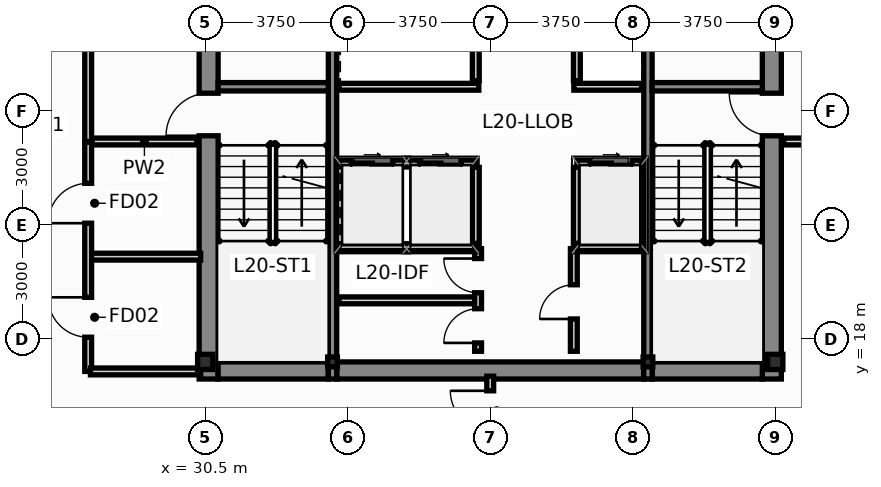
"""IFC4 building model, lengths in metres.
Left out: names, types, materials, properties, quantities, classifications, styles, units other than length and angle.
Written with IfcOpenShell. Run it as: python <this file> out.ifc"""

import sys

from ifc_helpers import new_model, si_unit, direction, frame, frame_2d, origin, origin_2d, place, context, subcontext, project, spatial, rectangle, i_section, extrude, source, transform, mapped, element, fill, save


model = new_model("IFC4")
c1 = context("Model", 3, precision=1e-05, world=origin(), true_north=direction((0.0, 1.0)))
c2 = subcontext(c1, "Body", "Model", "MODEL_VIEW")
j1 = project(units=[si_unit("LENGTHUNIT", "METRE"), si_unit("PLANEANGLEUNIT", "RADIAN")], contexts=[c1])
p1 = place(None, origin())
s1 = spatial("IfcSite", under=j1, at=p1, CompositionType="ELEMENT")
p2 = place(p1, origin())
s2 = spatial("IfcBuilding", under=s1, at=p2, CompositionType="ELEMENT")
p3 = place(p2, frame((0.0, 0.0, 79.85)))
s3 = spatial("IfcBuildingStorey", under=s2, at=p3, CompositionType="ELEMENT", Elevation=79.85)
m1 = source(origin(), c2, "Body", "SweptSolid", [
    extrude(i_section(OverallWidth=0.4, OverallDepth=0.4, WebThickness=0.02, FlangeThickness=0.032, at=origin_2d()), origin(), (0.0, 0.0, 1.0), 3.65),
])
for number, where, z_axis, x_axis in (
    (1, (30.5, 17.4, 0.0), (0.0, 0.0, 1.0), (1.0, 0.0, 0.0)),
    (2, (45.5, 17.4, 0.0), (0.0, 0.0, 1.0), (1.0, 0.0, 0.0)),
):
    element("IfcColumn", number, at=place(p3, frame(where, z_axis=z_axis, x_axis=x_axis)), inside=s3, PredefinedType="COLUMN", context=c2, shape_type="MappedRepresentation", body=[
        mapped(m1, transform((0.0, 0.0, 0.0), scale=1.0)),
    ])
m2 = source(origin(), c2, "Body", "SweptSolid", [
    extrude(i_section(OverallWidth=0.256, OverallDepth=0.26, WebThickness=0.01, FlangeThickness=0.017, at=origin_2d()), origin(), (0.0, 0.0, 1.0), 3.65),
])
for number, where, z_axis, x_axis in (
    (3, (33.85, 17.4, 0.0), (0.0, 0.0, 1.0), (1.0, 0.0, 0.0)),
    (4, (42.15, 17.4, 0.0), (0.0, 0.0, 1.0), (1.0, 0.0, 0.0)),
):
    element("IfcColumn", number, at=place(p3, frame(where, z_axis=z_axis, x_axis=x_axis)), inside=s3, PredefinedType="COLUMN", context=c2, shape_type="MappedRepresentation", body=[
        mapped(m2, transform((0.0, 0.0, 0.0), scale=1.0)),
    ])
p4 = place(p3, frame((30.59, 16.95, 0.0), z_axis=(0.0, 0.0, 1.0), x_axis=(0.0, 1.0, 0.0)))
e5 = element("IfcWall", 5, at=p4, inside=s3, PredefinedType="SHEAR", context=c2, shape_type="SweptSolid", body=[
    extrude(rectangle(XDim=13.275, YDim=0.5, at=frame_2d((6.638, 0.0))), origin(), (0.0, 0.0, 1.0), 3.65),
])
p5 = place(p4, frame((6.4, 0.0, 0.0)))
e6 = element("IfcOpeningElement", 6, at=p5, cuts=e5, PredefinedType="OPENING", context=c2, shape_type="SweptSolid", body=[
    extrude(rectangle(XDim=1.12, YDim=2.15, at=frame_2d((0.56, 1.075))), frame((0.0, 0.262, 0.0), z_axis=(0.0, -1.0, 0.0), x_axis=(1.0, 0.0, 0.0)), (0.0, 0.0, 1.0), 0.524),
])
p6 = place(p4, frame((10.85, 0.0, 0.0)))
e7 = element("IfcOpeningElement", 7, at=p6, cuts=e5, PredefinedType="OPENING", context=c2, shape_type="SweptSolid", body=[
    extrude(rectangle(XDim=1.2, YDim=2.2, at=frame_2d((0.6, 1.1))), frame((0.0, 0.262, 0.0), z_axis=(0.0, -1.0, 0.0), x_axis=(1.0, 0.0, 0.0)), (0.0, 0.0, 1.0), 0.524),
])
p7 = place(p3, frame((45.41, 16.95, 0.0), z_axis=(0.0, 0.0, 1.0), x_axis=(0.0, 1.0, 0.0)))
e8 = element("IfcWall", 8, at=p7, inside=s3, PredefinedType="SHEAR", context=c2, shape_type="SweptSolid", body=[
    extrude(rectangle(XDim=13.275, YDim=0.5, at=frame_2d((6.638, 0.0))), origin(), (0.0, 0.0, 1.0), 3.65),
])
p8 = place(p7, frame((6.4, 0.0, 0.0)))
e9 = element("IfcOpeningElement", 9, at=p8, cuts=e8, PredefinedType="OPENING", context=c2, shape_type="SweptSolid", body=[
    extrude(rectangle(XDim=1.12, YDim=2.15, at=frame_2d((0.56, 1.075))), frame((0.0, 0.262, 0.0), z_axis=(0.0, -1.0, 0.0), x_axis=(1.0, 0.0, 0.0)), (0.0, 0.0, 1.0), 0.524),
])
p9 = place(p7, frame((10.85, 0.0, 0.0)))
e10 = element("IfcOpeningElement", 10, at=p9, cuts=e8, PredefinedType="OPENING", context=c2, shape_type="SweptSolid", body=[
    extrude(rectangle(XDim=1.2, YDim=2.2, at=frame_2d((0.6, 1.1))), frame((0.0, 0.262, 0.0), z_axis=(0.0, -1.0, 0.0), x_axis=(1.0, 0.0, 0.0)), (0.0, 0.0, 1.0), 0.524),
])
p10 = place(p3, frame((30.84, 17.175, 0.0), z_axis=(0.0, 0.0, 1.0), x_axis=(1.0, 0.0, 0.0)))
e11 = element("IfcWall", 11, at=p10, inside=s3, PredefinedType="SHEAR", context=c2, shape_type="SweptSolid", body=[
    extrude(rectangle(XDim=2.9, YDim=0.45, at=frame_2d((1.45, 0.0))), origin(), (0.0, 0.0, 1.0), 3.65),
])
p11 = place(p3, frame((33.96, 17.175, 0.0), z_axis=(0.0, 0.0, 1.0), x_axis=(1.0, 0.0, 0.0)))
e12 = element("IfcWall", 12, at=p11, inside=s3, PredefinedType="SHEAR", context=c2, shape_type="SweptSolid", body=[
    extrude(rectangle(XDim=8.08, YDim=0.45, at=frame_2d((4.04, 0.0))), origin(), (0.0, 0.0, 1.0), 3.65),
])
p12 = place(p3, frame((42.26, 17.175, 0.0), z_axis=(0.0, 0.0, 1.0), x_axis=(1.0, 0.0, 0.0)))
e13 = element("IfcWall", 13, at=p12, inside=s3, PredefinedType="SHEAR", context=c2, shape_type="SweptSolid", body=[
    extrude(rectangle(XDim=2.9, YDim=0.45, at=frame_2d((1.45, 0.0))), origin(), (0.0, 0.0, 1.0), 3.65),
])
for number, where, z_axis, x_axis in (
    (14, (33.85, 16.95, 0.0), (0.0, 0.0, 1.0), (0.0, 1.0, 0.0)),
    (15, (42.15, 16.95, 0.0), (0.0, 0.0, 1.0), (0.0, 1.0, 0.0)),
):
    element("IfcWall", number, at=place(p3, frame(where, z_axis=z_axis, x_axis=x_axis)), inside=s3, PredefinedType="SHEAR", context=c2, shape_type="SweptSolid", body=[
        extrude(rectangle(XDim=13.275, YDim=0.22, at=frame_2d((6.638, 0.0))), origin(), (0.0, 0.0, 1.0), 3.65),
    ])
for number, where, z_axis, x_axis in (
    (16, (30.84, 24.64, 0.0), (0.0, 0.0, 1.0), (1.0, 0.0, 0.0)),
    (17, (42.26, 24.64, 0.0), (0.0, 0.0, 1.0), (1.0, 0.0, 0.0)),
):
    element("IfcWall", number, at=place(p3, frame(where, z_axis=z_axis, x_axis=x_axis)), inside=s3, PredefinedType="SHEAR", context=c2, shape_type="SweptSolid", body=[
        extrude(rectangle(XDim=2.9, YDim=0.22, at=frame_2d((1.45, 0.0))), origin(), (0.0, 0.0, 1.0), 3.65),
    ])
p13 = place(p3, frame((34.02, 22.62, 0.0), z_axis=(0.0, 0.0, 1.0), x_axis=(1.0, 0.0, 0.0)))
e18 = element("IfcWall", 18, at=p13, inside=s3, PredefinedType="PARTITIONING", context=c2, shape_type="SweptSolid", body=[
    extrude(rectangle(XDim=3.6, YDim=0.18, at=frame_2d((1.8, 0.0))), origin(), (0.0, 0.0, 1.0), 3.4),
])
p14 = place(p13, frame((0.32, 0.0, 0.0)))
e19 = element("IfcOpeningElement", 19, at=p14, cuts=e18, PredefinedType="OPENING", context=c2, shape_type="SweptSolid", body=[
    extrude(rectangle(XDim=1.1, YDim=2.2, at=frame_2d((0.55, 1.1))), frame((0.0, 0.102, 0.0), z_axis=(0.0, -1.0, 0.0), x_axis=(1.0, 0.0, 0.0)), (0.0, 0.0, 1.0), 0.204),
])
p15 = place(p13, frame((2.12, 0.0, 0.0)))
e20 = element("IfcOpeningElement", 20, at=p15, cuts=e18, PredefinedType="OPENING", context=c2, shape_type="SweptSolid", body=[
    extrude(rectangle(XDim=1.1, YDim=2.2, at=frame_2d((0.55, 1.1))), frame((0.0, 0.102, 0.0), z_axis=(0.0, -1.0, 0.0), x_axis=(1.0, 0.0, 0.0)), (0.0, 0.0, 1.0), 0.204),
])
p16 = place(p3, frame((40.28, 22.62, 0.0), z_axis=(0.0, 0.0, 1.0), x_axis=(1.0, 0.0, 0.0)))
e21 = element("IfcWall", 21, at=p16, inside=s3, PredefinedType="PARTITIONING", context=c2, shape_type="SweptSolid", body=[
    extrude(rectangle(XDim=1.7, YDim=0.18, at=frame_2d((0.85, 0.0))), origin(), (0.0, 0.0, 1.0), 3.4),
])
p17 = place(p16, frame((0.35, 0.0, 0.0)))
e22 = element("IfcOpeningElement", 22, at=p17, cuts=e21, PredefinedType="OPENING", context=c2, shape_type="SweptSolid", body=[
    extrude(rectangle(XDim=1.1, YDim=2.2, at=frame_2d((0.55, 1.1))), frame((0.0, 0.102, 0.0), z_axis=(0.0, -1.0, 0.0), x_axis=(1.0, 0.0, 0.0)), (0.0, 0.0, 1.0), 0.204),
])
for number, where, z_axis, x_axis in (
    (23, (37.62, 20.52, 0.0), (0.0, 0.0, 1.0), (0.0, 1.0, 0.0)),
    (24, (40.28, 20.52, 0.0), (0.0, 0.0, 1.0), (0.0, 1.0, 0.0)),
    (25, (37.62, 24.8, 0.0), (0.0, 0.0, 1.0), (0.0, 1.0, 0.0)),
    (26, (40.28, 24.8, 0.0), (0.0, 0.0, 1.0), (0.0, 1.0, 0.0)),
):
    element("IfcWall", number, at=place(p3, frame(where, z_axis=z_axis, x_axis=x_axis)), inside=s3, PredefinedType="PARTITIONING", context=c2, shape_type="SweptSolid", body=[
        extrude(rectangle(XDim=2.0, YDim=0.18, at=frame_2d((1.0, 0.0))), origin(), (0.0, 0.0, 1.0), 3.4),
    ])
p18 = place(p3, frame((34.02, 24.64, 0.0), z_axis=(0.0, 0.0, 1.0), x_axis=(1.0, 0.0, 0.0)))
e27 = element("IfcWall", 27, at=p18, inside=s3, PredefinedType="PARTITIONING", context=c2, shape_type="SweptSolid", body=[
    extrude(rectangle(XDim=3.68, YDim=0.18, at=frame_2d((1.84, 0.0))), origin(), (0.0, 0.0, 1.0), 3.4),
])
p19 = place(p3, frame((40.2, 24.64, 0.0), z_axis=(0.0, 0.0, 1.0), x_axis=(1.0, 0.0, 0.0)))
e28 = element("IfcWall", 28, at=p19, inside=s3, PredefinedType="PARTITIONING", context=c2, shape_type="SweptSolid", body=[
    extrude(rectangle(XDim=1.78, YDim=0.18, at=frame_2d((0.89, 0.0))), origin(), (0.0, 0.0, 1.0), 3.4),
])
p20 = place(p3, frame((27.42, 23.2, 0.0), z_axis=(0.0, 0.0, 1.0), x_axis=(0.0, 1.0, 0.0)))
e29 = element("IfcWall", 29, at=p20, inside=s3, PredefinedType="PARTITIONING", context=c2, shape_type="SweptSolid", body=[
    extrude(rectangle(XDim=6.4, YDim=0.18, at=frame_2d((3.2, 0.0))), origin(), (0.0, 0.0, 1.0), 3.4),
])
p21 = place(p20, frame((2.65, 0.0, 0.0)))
e30 = element("IfcOpeningElement", 30, at=p21, cuts=e29, PredefinedType="OPENING", context=c2, shape_type="SweptSolid", body=[
    extrude(rectangle(XDim=1.05, YDim=2.15, at=frame_2d((0.525, 1.075))), frame((0.0, 0.102, 0.0), z_axis=(0.0, -1.0, 0.0), x_axis=(1.0, 0.0, 0.0)), (0.0, 0.0, 1.0), 0.204),
])
for number, where, z_axis, x_axis in (
    (31, (27.52, 23.2, 0.0), (0.0, 0.0, 1.0), (1.0, 0.0, 0.0)),
    (32, (45.72, 23.2, 0.0), (0.0, 0.0, 1.0), (1.0, 0.0, 0.0)),
):
    element("IfcWall", number, at=place(p3, frame(where, z_axis=z_axis, x_axis=x_axis)), inside=s3, PredefinedType="PARTITIONING", context=c2, shape_type="SweptSolid", body=[
        extrude(rectangle(XDim=2.76, YDim=0.18, at=frame_2d((1.38, 0.0))), origin(), (0.0, 0.0, 1.0), 3.4),
    ])
p22 = place(p3, frame((34.02, 20.42, 0.0), z_axis=(0.0, 0.0, 1.0), x_axis=(1.0, 0.0, 0.0)))
e33 = element("IfcWall", 33, at=p22, inside=s3, PredefinedType="PARTITIONING", context=c2, shape_type="SweptSolid", body=[
    extrude(rectangle(XDim=3.64, YDim=0.18, at=frame_2d((1.82, 0.0))), origin(), (0.0, 0.0, 1.0), 3.4),
])
p23 = place(p3, frame((40.22, 20.42, 0.0), z_axis=(0.0, 0.0, 1.0), x_axis=(1.0, 0.0, 0.0)))
e34 = element("IfcWall", 34, at=p23, inside=s3, PredefinedType="PARTITIONING", context=c2, shape_type="SweptSolid", body=[
    extrude(rectangle(XDim=1.76, YDim=0.18, at=frame_2d((0.88, 0.0))), origin(), (0.0, 0.0, 1.0), 3.4),
])
p24 = place(p3, frame((34.02, 19.02, 0.0), z_axis=(0.0, 0.0, 1.0), x_axis=(1.0, 0.0, 0.0)))
e35 = element("IfcWall", 35, at=p24, inside=s3, PredefinedType="PARTITIONING", context=c2, shape_type="SweptSolid", body=[
    extrude(rectangle(XDim=3.58, YDim=0.18, at=frame_2d((1.79, 0.0))), origin(), (0.0, 0.0, 1.0), 3.4),
])
p25 = place(p3, frame((37.68, 17.68, 0.0), z_axis=(0.0, 0.0, 1.0), x_axis=(0.0, 1.0, 0.0)))
e36 = element("IfcWall", 36, at=p25, inside=s3, PredefinedType="PARTITIONING", context=c2, shape_type="SweptSolid", body=[
    extrude(rectangle(XDim=2.7, YDim=0.18, at=frame_2d((1.35, 0.0))), origin(), (0.0, 0.0, 1.0), 3.4),
])
p26 = place(p25, frame((0.22, 0.0, 0.0)))
e37 = element("IfcOpeningElement", 37, at=p26, cuts=e36, PredefinedType="OPENING", context=c2, shape_type="SweptSolid", body=[
    extrude(rectangle(XDim=0.9, YDim=2.1, at=frame_2d((0.45, 1.05))), frame((0.0, 0.102, 0.0), z_axis=(0.0, -1.0, 0.0), x_axis=(1.0, 0.0, 0.0)), (0.0, 0.0, 1.0), 0.204),
])
p27 = place(p25, frame((1.54, 0.0, 0.0)))
e38 = element("IfcOpeningElement", 38, at=p27, cuts=e36, PredefinedType="OPENING", context=c2, shape_type="SweptSolid", body=[
    extrude(rectangle(XDim=0.9, YDim=2.1, at=frame_2d((0.45, 1.05))), frame((0.0, 0.102, 0.0), z_axis=(0.0, -1.0, 0.0), x_axis=(1.0, 0.0, 0.0)), (0.0, 0.0, 1.0), 0.204),
])
p28 = place(p3, frame((40.2, 17.68, 0.0), z_axis=(0.0, 0.0, 1.0), x_axis=(0.0, 1.0, 0.0)))
e39 = element("IfcWall", 39, at=p28, inside=s3, PredefinedType="PARTITIONING", context=c2, shape_type="SweptSolid", body=[
    extrude(rectangle(XDim=2.7, YDim=0.18, at=frame_2d((1.35, 0.0))), origin(), (0.0, 0.0, 1.0), 3.4),
])
p29 = place(p28, frame((0.85, 0.0, 0.0)))
e40 = element("IfcOpeningElement", 40, at=p29, cuts=e39, PredefinedType="OPENING", context=c2, shape_type="SweptSolid", body=[
    extrude(rectangle(XDim=0.9, YDim=2.1, at=frame_2d((0.45, 1.05))), frame((0.0, 0.102, 0.0), z_axis=(0.0, -1.0, 0.0), x_axis=(1.0, 0.0, 0.0)), (0.0, 0.0, 1.0), 0.204),
])
p30 = place(p3, frame((27.48, 20.17, 0.0), z_axis=(0.0, 0.0, 1.0), x_axis=(1.0, 0.0, 0.0)))
e41 = element("IfcWall", 41, at=p30, inside=s3, PredefinedType="PARTITIONING", context=c2, shape_type="SweptSolid", body=[
    extrude(rectangle(XDim=2.9, YDim=0.18, at=frame_2d((1.45, 0.0))), origin(), (0.0, 0.0, 1.0), 3.4),
])
p31 = place(p3, frame((27.42, 17.15, 0.0), z_axis=(0.0, 0.0, 1.0), x_axis=(0.0, 1.0, 0.0)))
e42 = element("IfcWall", 42, at=p31, inside=s3, PredefinedType="PARTITIONING", context=c2, shape_type="SweptSolid", body=[
    extrude(rectangle(XDim=6.03, YDim=0.18, at=frame_2d((3.015, 0.0))), origin(), (0.0, 0.0, 1.0), 3.026),
])
p32 = place(p31, frame((0.9, 0.0, 0.0)))
e43 = element("IfcOpeningElement", 43, at=p32, cuts=e42, PredefinedType="OPENING", context=c2, shape_type="SweptSolid", body=[
    extrude(rectangle(XDim=1.05, YDim=2.15, at=frame_2d((0.525, 1.075))), frame((0.0, 0.102, 0.0), z_axis=(0.0, -1.0, 0.0), x_axis=(1.0, 0.0, 0.0)), (0.0, 0.0, 1.0), 0.204),
])
p33 = place(p31, frame((3.9, 0.0, 0.0)))
e44 = element("IfcOpeningElement", 44, at=p33, cuts=e42, PredefinedType="OPENING", context=c2, shape_type="SweptSolid", body=[
    extrude(rectangle(XDim=1.05, YDim=2.15, at=frame_2d((0.525, 1.075))), frame((0.0, 0.102, 0.0), z_axis=(0.0, -1.0, 0.0), x_axis=(1.0, 0.0, 0.0)), (0.0, 0.0, 1.0), 0.204),
])
p34 = place(p3, frame((27.48, 17.15, 0.0), z_axis=(0.0, 0.0, 1.0), x_axis=(1.0, 0.0, 0.0)))
e45 = element("IfcWall", 45, at=p34, inside=s3, PredefinedType="PARTITIONING", context=c2, shape_type="SweptSolid", body=[
    extrude(rectangle(XDim=2.9, YDim=0.18, at=frame_2d((1.45, 0.0))), origin(), (0.0, 0.0, 1.0), 2.783),
])
p35 = place(p3, frame((38.0, 15.205, 0.0), z_axis=(0.0, 0.0, 1.0), x_axis=(0.0, 1.0, 0.0)))
e46 = element("IfcWall", 46, at=p35, inside=s3, PredefinedType="PARTITIONING", context=c2, shape_type="SweptSolid", body=[
    extrude(rectangle(XDim=1.82, YDim=0.18, at=frame_2d((0.91, 0.0))), origin(), (0.0, 0.0, 1.0), 3.4),
])
p36 = place(p35, frame((0.385, 0.0, 0.0)))
e47 = element("IfcOpeningElement", 47, at=p36, cuts=e46, PredefinedType="OPENING", context=c2, shape_type="SweptSolid", body=[
    extrude(rectangle(XDim=1.05, YDim=2.15, at=frame_2d((0.525, 1.075))), frame((0.0, 0.102, 0.0), z_axis=(0.0, -1.0, 0.0), x_axis=(1.0, 0.0, 0.0)), (0.0, 0.0, 1.0), 0.204),
])
p37 = place(p5, origin())
e48 = element("IfcDoor", 48, at=p37, inside=s3, OperationType="SINGLE_SWING_LEFT", PredefinedType="DOOR", context=c2, shape_type="SweptSolid", body=[
    extrude(rectangle(XDim=1.12, YDim=2.15, at=frame_2d((0.56, 1.075))), frame((0.0, 0.025, 0.0), z_axis=(0.0, -1.0, 0.0), x_axis=(1.0, 0.0, 0.0)), (0.0, 0.0, 1.0), 0.05),
])
fill(e6, e48)
p38 = place(p8, origin())
e49 = element("IfcDoor", 49, at=p38, inside=s3, OperationType="SINGLE_SWING_RIGHT", PredefinedType="DOOR", context=c2, shape_type="SweptSolid", body=[
    extrude(rectangle(XDim=1.12, YDim=2.15, at=frame_2d((0.56, 1.075))), frame((0.0, 0.025, 0.0), z_axis=(0.0, -1.0, 0.0), x_axis=(1.0, 0.0, 0.0)), (0.0, 0.0, 1.0), 0.05),
])
fill(e9, e49)
p39 = place(p14, origin())
e50 = element("IfcDoor", 50, at=p39, inside=s3, OperationType="SLIDING_TO_LEFT", PredefinedType="DOOR", context=c2, shape_type="SweptSolid", body=[
    extrude(rectangle(XDim=1.1, YDim=2.2, at=frame_2d((0.55, 1.1))), frame((0.0, 0.025, 0.0), z_axis=(0.0, -1.0, 0.0), x_axis=(1.0, 0.0, 0.0)), (0.0, 0.0, 1.0), 0.05),
])
fill(e19, e50)
p40 = place(p15, origin())
e51 = element("IfcDoor", 51, at=p40, inside=s3, OperationType="SLIDING_TO_RIGHT", PredefinedType="DOOR", context=c2, shape_type="SweptSolid", body=[
    extrude(rectangle(XDim=1.1, YDim=2.2, at=frame_2d((0.55, 1.1))), frame((0.0, 0.025, 0.0), z_axis=(0.0, -1.0, 0.0), x_axis=(1.0, 0.0, 0.0)), (0.0, 0.0, 1.0), 0.05),
])
fill(e20, e51)
p41 = place(p17, origin())
e52 = element("IfcDoor", 52, at=p41, inside=s3, OperationType="SLIDING_TO_LEFT", PredefinedType="DOOR", context=c2, shape_type="SweptSolid", body=[
    extrude(rectangle(XDim=1.1, YDim=2.2, at=frame_2d((0.55, 1.1))), frame((0.0, 0.025, 0.0), z_axis=(0.0, -1.0, 0.0), x_axis=(1.0, 0.0, 0.0)), (0.0, 0.0, 1.0), 0.05),
])
fill(e22, e52)
p42 = place(p26, origin())
e53 = element("IfcDoor", 53, at=p42, inside=s3, OperationType="SINGLE_SWING_LEFT", PredefinedType="DOOR", context=c2, shape_type="SweptSolid", body=[
    extrude(rectangle(XDim=0.9, YDim=2.1, at=frame_2d((0.45, 1.05))), frame((0.0, 0.025, 0.0), z_axis=(0.0, -1.0, 0.0), x_axis=(1.0, 0.0, 0.0)), (0.0, 0.0, 1.0), 0.05),
])
fill(e37, e53)
p43 = place(p27, origin())
e54 = element("IfcDoor", 54, at=p43, inside=s3, OperationType="SINGLE_SWING_RIGHT", PredefinedType="DOOR", context=c2, shape_type="SweptSolid", body=[
    extrude(rectangle(XDim=0.9, YDim=2.1, at=frame_2d((0.45, 1.05))), frame((0.0, 0.025, 0.0), z_axis=(0.0, -1.0, 0.0), x_axis=(1.0, 0.0, 0.0)), (0.0, 0.0, 1.0), 0.05),
])
fill(e38, e54)
p44 = place(p29, origin())
e55 = element("IfcDoor", 55, at=p44, inside=s3, OperationType="SINGLE_SWING_LEFT", PredefinedType="DOOR", context=c2, shape_type="SweptSolid", body=[
    extrude(rectangle(XDim=0.9, YDim=2.1, at=frame_2d((0.45, 1.05))), frame((0.0, 0.025, 0.0), z_axis=(0.0, -1.0, 0.0), x_axis=(1.0, 0.0, 0.0)), (0.0, 0.0, 1.0), 0.05),
])
fill(e40, e55)
p45 = place(p32, origin())
e56 = element("IfcDoor", 56, at=p45, inside=s3, OperationType="SINGLE_SWING_RIGHT", PredefinedType="DOOR", context=c2, shape_type="SweptSolid", body=[
    extrude(rectangle(XDim=1.05, YDim=2.15, at=frame_2d((0.525, 1.075))), frame((0.0, 0.025, 0.0), z_axis=(0.0, -1.0, 0.0), x_axis=(1.0, 0.0, 0.0)), (0.0, 0.0, 1.0), 0.05),
])
fill(e43, e56)
p46 = place(p33, origin())
e57 = element("IfcDoor", 57, at=p46, inside=s3, OperationType="SINGLE_SWING_LEFT", PredefinedType="DOOR", context=c2, shape_type="SweptSolid", body=[
    extrude(rectangle(XDim=1.05, YDim=2.15, at=frame_2d((0.525, 1.075))), frame((0.0, 0.025, 0.0), z_axis=(0.0, -1.0, 0.0), x_axis=(1.0, 0.0, 0.0)), (0.0, 0.0, 1.0), 0.05),
])
fill(e44, e57)
p47 = place(p36, origin())
e58 = element("IfcDoor", 58, at=p47, inside=s3, OperationType="SINGLE_SWING_RIGHT", PredefinedType="DOOR", context=c2, shape_type="SweptSolid", body=[
    extrude(rectangle(XDim=1.05, YDim=2.15, at=frame_2d((0.525, 1.075))), frame((0.0, 0.025, 0.0), z_axis=(0.0, -1.0, 0.0), x_axis=(1.0, 0.0, 0.0)), (0.0, 0.0, 1.0), 0.05),
])
fill(e47, e58)
save(model, sys.argv[1])
